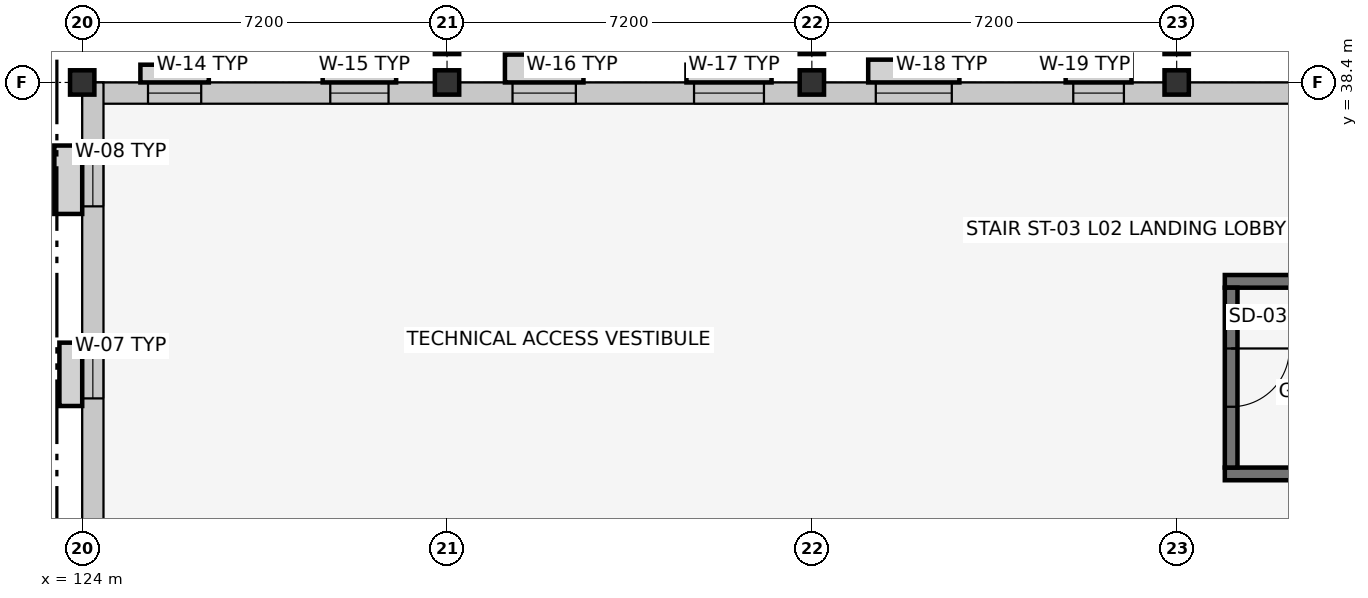
"""IFC4 building model, lengths in metres.
Left out: names, types, materials, properties, quantities, classifications, styles, units other than length and angle.
Written with IfcOpenShell. Run it as: python <this file> out.ifc"""

import sys

from ifc_helpers import new_model, si_unit, direction, frame, frame_2d, origin, origin_2d, place, context, subcontext, project, spatial, rectangle, extrude, element, fill, save


model = new_model("IFC4")
c1 = context("Model", 3, precision=1e-05, world=origin(), true_north=direction((0.0, 1.0)))
c2 = subcontext(c1, "Body", "Model", "MODEL_VIEW")
j1 = project(units=[si_unit("LENGTHUNIT", "METRE"), si_unit("PLANEANGLEUNIT", "RADIAN")], contexts=[c1])
p1 = place(None, origin())
s1 = spatial("IfcSite", under=j1, at=p1, CompositionType="ELEMENT")
p2 = place(p1, origin())
s2 = spatial("IfcBuilding", under=s1, at=p2, CompositionType="ELEMENT")
p3 = place(p2, frame((0.0, 0.0, 9.6)))
s3 = spatial("IfcBuildingStorey", under=s2, at=p3, CompositionType="ELEMENT", Elevation=9.6)
for number, where, z_axis, x_axis in (
    (1, (124.0, 38.4, 0.0), (0.0, 0.0, 1.0), (1.0, 0.0, 0.0)),
    (2, (131.2, 38.4, 0.0), (0.0, 0.0, 1.0), (1.0, 0.0, 0.0)),
    (3, (138.4, 38.4, 0.0), (0.0, 0.0, 1.0), (1.0, 0.0, 0.0)),
    (4, (145.6, 38.4, 0.0), (0.0, 0.0, 1.0), (1.0, 0.0, 0.0)),
    (5, (131.2, 39.2, 0.0), (0.0, 0.0, 1.0), (1.0, 0.0, 0.0)),
    (6, (138.4, 39.2, 0.0), (0.0, 0.0, 1.0), (1.0, 0.0, 0.0)),
    (7, (145.6, 39.2, 0.0), (0.0, 0.0, 1.0), (1.0, 0.0, 0.0)),
):
    element("IfcColumn", number, at=place(p3, frame(where, z_axis=z_axis, x_axis=x_axis)), inside=s3, PredefinedType="COLUMN", context=c2, shape_type="SweptSolid", body=[
        extrude(rectangle(XDim=0.48, YDim=0.48, at=origin_2d()), origin(), (0.0, 0.0, 1.0), 4.2),
    ])
p4 = place(p3, frame((124.0, 38.19, 0.0), z_axis=(0.0, 0.0, 1.0), x_axis=(1.0, 0.0, 0.0)))
e8 = element("IfcWall", 8, at=p4, inside=s3, PredefinedType="SOLIDWALL", context=c2, shape_type="SweptSolid", body=[
    extrude(rectangle(XDim=62.0, YDim=0.42, at=frame_2d((31.0, 0.0))), origin(), (0.0, 0.0, 1.0), 3.675),
])
p5 = place(p4, frame((1.299, 0.0, 0.9)))
e9 = element("IfcOpeningElement", 9, at=p5, cuts=e8, PredefinedType="OPENING", context=c2, shape_type="SweptSolid", body=[
    extrude(rectangle(XDim=1.05, YDim=1.6, at=frame_2d((0.525, 0.8))), frame((0.0, 0.222, 0.0), z_axis=(0.0, -1.0, 0.0), x_axis=(1.0, 0.0, 0.0)), (0.0, 0.0, 1.0), 0.444),
])
p6 = place(p4, frame((4.896, 0.0, 0.9)))
e10 = element("IfcOpeningElement", 10, at=p6, cuts=e8, PredefinedType="OPENING", context=c2, shape_type="SweptSolid", body=[
    extrude(rectangle(XDim=1.15, YDim=1.6, at=frame_2d((0.575, 0.8))), frame((0.0, 0.222, 0.0), z_axis=(0.0, -1.0, 0.0), x_axis=(1.0, 0.0, 0.0)), (0.0, 0.0, 1.0), 0.444),
])
p7 = place(p4, frame((8.493, 0.0, 0.9)))
e11 = element("IfcOpeningElement", 11, at=p7, cuts=e8, PredefinedType="OPENING", context=c2, shape_type="SweptSolid", body=[
    extrude(rectangle(XDim=1.25, YDim=1.6, at=frame_2d((0.625, 0.8))), frame((0.0, 0.222, 0.0), z_axis=(0.0, -1.0, 0.0), x_axis=(1.0, 0.0, 0.0)), (0.0, 0.0, 1.0), 0.444),
])
p8 = place(p4, frame((12.075, 0.0, 0.9)))
e12 = element("IfcOpeningElement", 12, at=p8, cuts=e8, PredefinedType="OPENING", context=c2, shape_type="SweptSolid", body=[
    extrude(rectangle(XDim=1.38, YDim=1.6, at=frame_2d((0.69, 0.8))), frame((0.0, 0.222, 0.0), z_axis=(0.0, -1.0, 0.0), x_axis=(1.0, 0.0, 0.0)), (0.0, 0.0, 1.0), 0.444),
])
p9 = place(p4, frame((15.662, 0.0, 0.9)))
e13 = element("IfcOpeningElement", 13, at=p9, cuts=e8, PredefinedType="OPENING", context=c2, shape_type="SweptSolid", body=[
    extrude(rectangle(XDim=1.5, YDim=1.6, at=frame_2d((0.75, 0.8))), frame((0.0, 0.222, 0.0), z_axis=(0.0, -1.0, 0.0), x_axis=(1.0, 0.0, 0.0)), (0.0, 0.0, 1.0), 0.444),
])
p10 = place(p4, frame((19.559, 0.0, 0.9)))
e14 = element("IfcOpeningElement", 14, at=p10, cuts=e8, PredefinedType="OPENING", context=c2, shape_type="SweptSolid", body=[
    extrude(rectangle(XDim=1.0, YDim=1.75, at=frame_2d((0.5, 0.875))), frame((0.0, 0.222, 0.0), z_axis=(0.0, -1.0, 0.0), x_axis=(1.0, 0.0, 0.0)), (0.0, 0.0, 1.0), 0.444),
])
p11 = place(p4, frame((26.733, 0.0, 0.9)))
e15 = element("IfcOpeningElement", 15, at=p11, cuts=e8, PredefinedType="OPENING", context=c2, shape_type="SweptSolid", body=[
    extrude(rectangle(XDim=1.24, YDim=1.75, at=frame_2d((0.62, 0.875))), frame((0.0, 0.222, 0.0), z_axis=(0.0, -1.0, 0.0), x_axis=(1.0, 0.0, 0.0)), (0.0, 0.0, 1.0), 0.444),
])
p12 = place(p4, frame((37.544, 0.0, 0.9)))
e16 = element("IfcOpeningElement", 16, at=p12, cuts=e8, PredefinedType="OPENING", context=c2, shape_type="SweptSolid", body=[
    extrude(rectangle(XDim=1.5, YDim=1.75, at=frame_2d((0.75, 0.875))), frame((0.0, 0.222, 0.0), z_axis=(0.0, -1.0, 0.0), x_axis=(1.0, 0.0, 0.0)), (0.0, 0.0, 1.0), 0.444),
])
p13 = place(p4, frame((48.685, 0.0, 0.9)))
e17 = element("IfcOpeningElement", 17, at=p13, cuts=e8, PredefinedType="OPENING", context=c2, shape_type="SweptSolid", body=[
    extrude(rectangle(XDim=1.1, YDim=1.35, at=frame_2d((0.55, 0.675))), frame((0.0, 0.222, 0.0), z_axis=(0.0, -1.0, 0.0), x_axis=(1.0, 0.0, 0.0)), (0.0, 0.0, 1.0), 0.444),
])
p14 = place(p4, frame((59.477, 0.0, 0.9)))
e18 = element("IfcOpeningElement", 18, at=p14, cuts=e8, PredefinedType="OPENING", context=c2, shape_type="SweptSolid", body=[
    extrude(rectangle(XDim=1.4, YDim=1.35, at=frame_2d((0.7, 0.675))), frame((0.0, 0.222, 0.0), z_axis=(0.0, -1.0, 0.0), x_axis=(1.0, 0.0, 0.0)), (0.0, 0.0, 1.0), 0.444),
])
p15 = place(p3, frame((124.21, 0.0, 0.0), z_axis=(0.0, 0.0, 1.0), x_axis=(0.0, 1.0, 0.0)))
e19 = element("IfcWall", 19, at=p15, inside=s3, PredefinedType="SOLIDWALL", context=c2, shape_type="SweptSolid", body=[
    extrude(rectangle(XDim=38.4, YDim=0.42, at=frame_2d((19.2, 0.0))), origin(), (0.0, 0.0, 1.0), 3.825),
])
p16 = place(p15, frame((32.165, 0.0, 0.9)))
e20 = element("IfcOpeningElement", 20, at=p16, cuts=e19, PredefinedType="OPENING", context=c2, shape_type="SweptSolid", body=[
    extrude(rectangle(XDim=0.95, YDim=1.45, at=frame_2d((0.475, 0.725))), frame((0.0, 0.222, 0.0), z_axis=(0.0, -1.0, 0.0), x_axis=(1.0, 0.0, 0.0)), (0.0, 0.0, 1.0), 0.444),
])
p17 = place(p15, frame((35.955, 0.0, 0.9)))
e21 = element("IfcOpeningElement", 21, at=p17, cuts=e19, PredefinedType="OPENING", context=c2, shape_type="SweptSolid", body=[
    extrude(rectangle(XDim=1.05, YDim=1.45, at=frame_2d((0.525, 0.725))), frame((0.0, 0.222, 0.0), z_axis=(0.0, -1.0, 0.0), x_axis=(1.0, 0.0, 0.0)), (0.0, 0.0, 1.0), 0.444),
])
for number, where, z_axis, x_axis in (
    (22, (146.55, 30.675, 0.0), (0.0, 0.0, 1.0), (1.0, 0.0, 0.0)),
    (23, (155.45, 34.475, 0.0), (0.0, 0.0, 1.0), (-1.0, 0.0, 0.0)),
):
    element("IfcWall", number, at=place(p3, frame(where, z_axis=z_axis, x_axis=x_axis)), inside=s3, PredefinedType="SHEAR", context=c2, shape_type="SweptSolid", body=[
        extrude(rectangle(XDim=8.9, YDim=0.25, at=frame_2d((4.45, 0.0))), origin(), (0.0, 0.0, 1.0), 3.95),
    ])
p18 = place(p3, frame((146.675, 34.35, 0.0), z_axis=(0.0, 0.0, 1.0), x_axis=(0.0, -1.0, 0.0)))
e24 = element("IfcWall", 24, at=p18, inside=s3, PredefinedType="SHEAR", context=c2, shape_type="SweptSolid", body=[
    extrude(rectangle(XDim=3.55, YDim=0.25, at=frame_2d((1.775, 0.0))), origin(), (0.0, 0.0, 1.0), 3.95),
])
p19 = place(p18, frame((1.2, 0.0, 0.0)))
e25 = element("IfcOpeningElement", 25, at=p19, cuts=e24, PredefinedType="OPENING", context=c2, shape_type="SweptSolid", body=[
    extrude(rectangle(XDim=1.15, YDim=2.15, at=frame_2d((0.575, 1.075))), frame((0.0, 0.137, 0.0), z_axis=(0.0, -1.0, 0.0), x_axis=(1.0, 0.0, 0.0)), (0.0, 0.0, 1.0), 0.274),
])
p20 = place(p5, origin())
e26 = element("IfcWindow", 26, at=p20, inside=s3, PartitioningType="SINGLE_PANEL", PredefinedType="WINDOW", context=c2, shape_type="SweptSolid", body=[
    extrude(rectangle(XDim=1.05, YDim=1.6, at=frame_2d((0.525, 0.8))), frame((0.0, 0.03, 0.0), z_axis=(0.0, -1.0, 0.0), x_axis=(1.0, 0.0, 0.0)), (0.0, 0.0, 1.0), 0.06),
])
fill(e9, e26)
p21 = place(p6, origin())
e27 = element("IfcWindow", 27, at=p21, inside=s3, PartitioningType="SINGLE_PANEL", PredefinedType="WINDOW", context=c2, shape_type="SweptSolid", body=[
    extrude(rectangle(XDim=1.15, YDim=1.6, at=frame_2d((0.575, 0.8))), frame((0.0, 0.03, 0.0), z_axis=(0.0, -1.0, 0.0), x_axis=(1.0, 0.0, 0.0)), (0.0, 0.0, 1.0), 0.06),
])
fill(e10, e27)
p22 = place(p7, origin())
e28 = element("IfcWindow", 28, at=p22, inside=s3, PartitioningType="SINGLE_PANEL", PredefinedType="WINDOW", context=c2, shape_type="SweptSolid", body=[
    extrude(rectangle(XDim=1.25, YDim=1.6, at=frame_2d((0.625, 0.8))), frame((0.0, 0.03, 0.0), z_axis=(0.0, -1.0, 0.0), x_axis=(1.0, 0.0, 0.0)), (0.0, 0.0, 1.0), 0.06),
])
fill(e11, e28)
p23 = place(p8, origin())
e29 = element("IfcWindow", 29, at=p23, inside=s3, PartitioningType="SINGLE_PANEL", PredefinedType="WINDOW", context=c2, shape_type="SweptSolid", body=[
    extrude(rectangle(XDim=1.38, YDim=1.6, at=frame_2d((0.69, 0.8))), frame((0.0, 0.03, 0.0), z_axis=(0.0, -1.0, 0.0), x_axis=(1.0, 0.0, 0.0)), (0.0, 0.0, 1.0), 0.06),
])
fill(e12, e29)
p24 = place(p9, origin())
e30 = element("IfcWindow", 30, at=p24, inside=s3, PartitioningType="SINGLE_PANEL", PredefinedType="WINDOW", context=c2, shape_type="SweptSolid", body=[
    extrude(rectangle(XDim=1.5, YDim=1.6, at=frame_2d((0.75, 0.8))), frame((0.0, 0.03, 0.0), z_axis=(0.0, -1.0, 0.0), x_axis=(1.0, 0.0, 0.0)), (0.0, 0.0, 1.0), 0.06),
])
fill(e13, e30)
p25 = place(p10, origin())
e31 = element("IfcWindow", 31, at=p25, inside=s3, PartitioningType="SINGLE_PANEL", PredefinedType="WINDOW", context=c2, shape_type="SweptSolid", body=[
    extrude(rectangle(XDim=1.0, YDim=1.75, at=frame_2d((0.5, 0.875))), frame((0.0, 0.03, 0.0), z_axis=(0.0, -1.0, 0.0), x_axis=(1.0, 0.0, 0.0)), (0.0, 0.0, 1.0), 0.06),
])
fill(e14, e31)
p26 = place(p16, origin())
e32 = element("IfcWindow", 32, at=p26, inside=s3, PartitioningType="SINGLE_PANEL", PredefinedType="WINDOW", context=c2, shape_type="SweptSolid", body=[
    extrude(rectangle(XDim=0.95, YDim=1.45, at=frame_2d((0.475, 0.725))), frame((0.0, 0.03, 0.0), z_axis=(0.0, -1.0, 0.0), x_axis=(1.0, 0.0, 0.0)), (0.0, 0.0, 1.0), 0.06),
])
fill(e20, e32)
p27 = place(p17, origin())
e33 = element("IfcWindow", 33, at=p27, inside=s3, PartitioningType="SINGLE_PANEL", PredefinedType="WINDOW", context=c2, shape_type="SweptSolid", body=[
    extrude(rectangle(XDim=1.05, YDim=1.45, at=frame_2d((0.525, 0.725))), frame((0.0, 0.03, 0.0), z_axis=(0.0, -1.0, 0.0), x_axis=(1.0, 0.0, 0.0)), (0.0, 0.0, 1.0), 0.06),
])
fill(e21, e33)
p28 = place(p19, origin())
e34 = element("IfcDoor", 34, at=p28, inside=s3, OperationType="SINGLE_SWING_LEFT", PredefinedType="DOOR", context=c2, shape_type="SweptSolid", body=[
    extrude(rectangle(XDim=1.15, YDim=2.15, at=frame_2d((0.575, 1.075))), frame((0.0, 0.025, 0.0), z_axis=(0.0, -1.0, 0.0), x_axis=(1.0, 0.0, 0.0)), (0.0, 0.0, 1.0), 0.05),
])
fill(e25, e34)
save(model, sys.argv[1])
